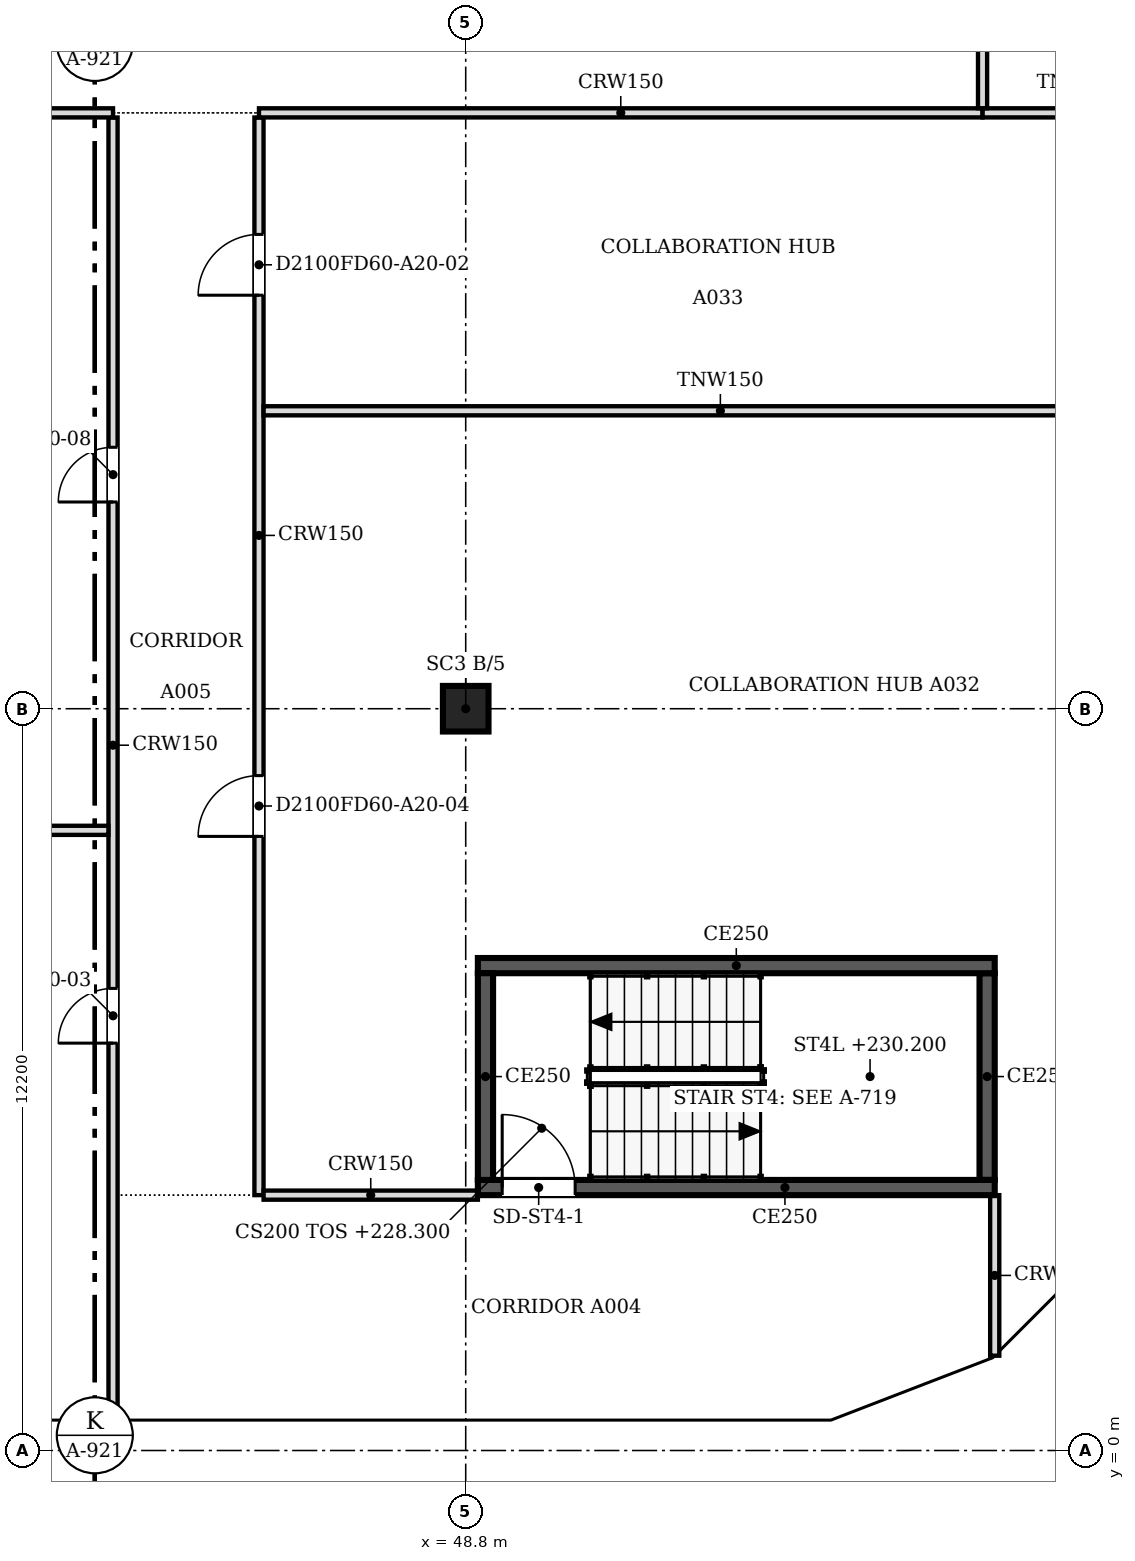
"""IFC4 building model, lengths in metres.
Left out: names, types, materials, properties, quantities, classifications, styles, units other than length and angle.
Written with IfcOpenShell. Run it as: python <this file> out.ifc"""

import sys

from ifc_helpers import new_model, si_unit, direction, frame, frame_2d, origin, origin_2d, place, context, subcontext, project, spatial, polyline, rectangle, outline, extrude, faceted_brep, source, transform, mapped, element, fill, save


model = new_model("IFC4")
c1 = context("Model", 3, precision=1e-05, world=origin(), true_north=direction((0.0, 1.0)))
c2 = subcontext(c1, "Body", "Model", "MODEL_VIEW")
j1 = project(units=[si_unit("LENGTHUNIT", "METRE"), si_unit("PLANEANGLEUNIT", "RADIAN")], contexts=[c1])
p1 = place(None, origin())
s1 = spatial("IfcSite", under=j1, at=p1, CompositionType="ELEMENT")
p2 = place(p1, origin())
s2 = spatial("IfcBuilding", under=s1, at=p2, CompositionType="ELEMENT")
p3 = place(p2, frame((0.0, 0.0, 228.3)))
s3 = spatial("IfcBuildingStorey", under=s2, at=p3, CompositionType="ELEMENT", Elevation=228.3)
p4 = place(p3, frame((48.8, 12.2, 0.0), z_axis=(0.0, 0.0, 1.0), x_axis=(1.0, 0.0, 0.0)))
e1 = element("IfcColumn", 1, at=p4, inside=s3, PredefinedType="COLUMN", context=c2, shape_type="SweptSolid", body=[
    extrude(rectangle(XDim=0.75, YDim=0.75, at=origin_2d()), origin(), (0.0, 0.0, 1.0), 3.5),
])
m1 = source(origin(), c2, "Body", "SweptSolid", [
    extrude(outline(polyline([(3.05, 0.0), (6.1, 3.8), (3.05, 7.6), (0.0, 3.8), (3.05, 0.0)])), frame((0.0, 0.25, 0.0), z_axis=(0.0, -1.0, 0.0), x_axis=(1.0, 0.0, 0.0)), (0.0, 0.0, 1.0), 0.5),
])
p5 = place(p3, frame((39.65, 0.25, -3.8), z_axis=(0.0, 0.0, 1.0), x_axis=(1.0, 0.0, 0.0)))
e2 = element("IfcWall", 2, at=p5, inside=s3, PredefinedType="SOLIDWALL", context=c2, shape_type="MappedRepresentation", body=[
    mapped(m1, transform((0.0, 0.0, 0.0), scale=1.0)),
])
m2 = source(origin(), c2, "Body", "SweptSolid", [
    extrude(outline(polyline([(3.05, 0.399), (5.78, 3.8), (3.05, 7.201), (0.321, 3.8), (3.05, 0.399)])), frame((0.0, 0.26, 0.0), z_axis=(0.0, -1.0, 0.0), x_axis=(1.0, 0.0, 0.0)), (0.0, 0.0, 1.0), 0.52),
])
p6 = place(p5, origin())
e3 = element("IfcOpeningElement", 3, at=p6, cuts=e2, PredefinedType="OPENING", context=c2, shape_type="MappedRepresentation", body=[
    mapped(m2, transform((0.0, 0.0, 0.0), scale=1.0)),
])
p7 = place(p3, frame((45.75, 0.25, -3.8), z_axis=(0.0, 0.0, 1.0), x_axis=(1.0, 0.0, 0.0)))
e4 = element("IfcWall", 4, at=p7, inside=s3, PredefinedType="SOLIDWALL", context=c2, shape_type="MappedRepresentation", body=[
    mapped(m1, transform((0.0, 0.0, 0.0), scale=1.0)),
])
p8 = place(p7, origin())
e5 = element("IfcOpeningElement", 5, at=p8, cuts=e4, PredefinedType="OPENING", context=c2, shape_type="MappedRepresentation", body=[
    mapped(m2, transform((0.0, 0.0, 0.0), scale=1.0)),
])
m3 = source(origin(), c2, "Body", "Brep", [
    faceted_brep([(3.003, -0.25, 0.0), (3.05, -0.25, 0.06), (3.05, -0.25, 7.54), (3.003, -0.25, 7.6), (0.0, -0.25, 3.8), (0.0, 0.25, 3.8), (2.957, 0.25, 7.541), (2.957, 0.25, 0.059), (3.003, 0.0, 0.0), (3.003, 0.0, 7.6)], [[[0, 1, 2, 3, 4]], [[5, 6, 7]], [[1, 0, 8]], [[9, 3, 2]], [[6, 5, 4, 3, 9]], [[5, 7, 8, 0, 4]], [[1, 8, 7, 6, 9, 2]]]),
])
p9 = place(p3, frame((51.85, 0.25, -3.8), z_axis=(0.0, 0.0, 1.0), x_axis=(1.0, 0.0, 0.0)))
e6 = element("IfcWall", 6, at=p9, inside=s3, PredefinedType="SOLIDWALL", context=c2, shape_type="MappedRepresentation", body=[
    mapped(m3, transform((0.0, 0.0, 0.0), scale=1.0)),
])
m4 = source(origin(), c2, "Body", "SweptSolid", [
    extrude(outline(polyline([(2.803, 6.944), (0.319, 3.8), (2.803, 0.656), (2.803, 6.944)])), frame((0.0, 0.26, 0.0), z_axis=(0.0, -1.0, 0.0), x_axis=(1.0, 0.0, 0.0)), (0.0, 0.0, 1.0), 0.52),
])
p10 = place(p9, origin())
e7 = element("IfcOpeningElement", 7, at=p10, cuts=e6, PredefinedType="OPENING", context=c2, shape_type="MappedRepresentation", body=[
    mapped(m4, transform((0.0, 0.0, 0.0), scale=1.0)),
])
m5 = source(origin(), c2, "Body", "Brep", [
    faceted_brep([(0.047, -0.25, 0.0), (2.997, -0.25, 3.8), (0.047, -0.25, 7.6), (0.0, -0.25, 7.541), (0.0, -0.25, 0.059), (0.093, 0.25, 7.54), (2.944, 0.25, 3.868), (2.944, 0.25, 3.732), (0.093, 0.25, 0.06), (2.997, 0.0, 3.8), (0.047, 0.0, 0.0), (0.047, 0.0, 7.6)], [[[0, 1, 2, 3, 4]], [[5, 6, 7, 8]], [[8, 7, 9, 1, 0, 10]], [[6, 5, 11, 2, 1, 9]], [[3, 2, 11]], [[10, 0, 4]], [[8, 10, 4, 3, 11, 5]], [[9, 7, 6]]]),
])
p11 = place(p3, frame((54.81, 0.233, -3.8), z_axis=(0.0, 0.0, 1.0), x_axis=(0.932990326376, 0.359901446078, 0.0)))
e8 = element("IfcWall", 8, at=p11, inside=s3, PredefinedType="SOLIDWALL", context=c2, shape_type="MappedRepresentation", body=[
    mapped(m5, transform((0.0, 0.0, 0.0), scale=1.0)),
])
m6 = source(origin(), c2, "Body", "SweptSolid", [
    extrude(outline(polyline([(0.247, 0.665), (2.681, 3.8), (0.247, 6.935), (0.247, 0.665)])), frame((0.0, 0.26, 0.0), z_axis=(0.0, -1.0, 0.0), x_axis=(1.0, 0.0, 0.0)), (0.0, 0.0, 1.0), 0.52),
])
p12 = place(p11, origin())
e9 = element("IfcOpeningElement", 9, at=p12, cuts=e8, PredefinedType="OPENING", context=c2, shape_type="MappedRepresentation", body=[
    mapped(m6, transform((0.0, 0.0, 0.0), scale=1.0)),
])
m7 = source(origin(), c2, "Body", "Brep", [
    faceted_brep([(2.944, -0.25, 0.0), (2.997, -0.25, 0.068), (2.997, -0.25, 7.532), (2.944, -0.25, 7.6), (0.0, -0.25, 3.8), (0.053, 0.25, 3.868), (2.891, 0.25, 7.532), (2.891, 0.25, 0.068), (0.053, 0.25, 3.732), (2.944, 0.0, 0.0), (2.944, 0.0, 7.6), (0.0, 0.0, 3.8)], [[[0, 1, 2, 3, 4]], [[5, 6, 7, 8]], [[1, 0, 9]], [[10, 3, 2]], [[6, 5, 11, 4, 3, 10]], [[8, 7, 9, 0, 4, 11]], [[8, 11, 5]], [[1, 9, 7, 6, 10, 2]]]),
])
p13 = place(p3, frame((57.606, 1.312, -3.8), z_axis=(0.0, 0.0, 1.0), x_axis=(0.707147509625, 0.707066050402, 0.0)))
e10 = element("IfcWall", 10, at=p13, inside=s3, PredefinedType="SOLIDWALL", context=c2, shape_type="MappedRepresentation", body=[
    mapped(m7, transform((0.0, 0.0, 0.0), scale=1.0)),
])
m8 = source(origin(), c2, "Body", "SweptSolid", [
    extrude(outline(polyline([(2.744, 6.934), (0.316, 3.8), (2.744, 0.666), (2.744, 6.934)])), frame((0.0, 0.26, 0.0), z_axis=(0.0, -1.0, 0.0), x_axis=(1.0, 0.0, 0.0)), (0.0, 0.0, 1.0), 0.52),
])
p14 = place(p13, origin())
e11 = element("IfcOpeningElement", 11, at=p14, cuts=e10, PredefinedType="OPENING", context=c2, shape_type="MappedRepresentation", body=[
    mapped(m8, transform((0.0, 0.0, 0.0), scale=1.0)),
])
m9 = source(origin(), c2, "Body", "Brep", [
    faceted_brep([(3.05, -0.25, 0.0), (6.1, -0.25, 3.8), (6.1, -0.25, 3.8), (0.0, -0.25, 3.8), (0.0, 0.25, 3.8), (6.1, 0.25, 3.8), (6.1, 0.25, 3.8), (3.05, 0.25, 0.0)], [[[0, 1, 2, 3]], [[4, 5, 6, 7]], [[7, 6, 1, 0]], [[5, 4, 3, 2]], [[4, 7, 0, 3]], [[1, 6, 5, 2]]]),
])
p15 = place(p3, frame((36.6, 0.25, 0.0), z_axis=(0.0, 0.0, 1.0), x_axis=(1.0, 0.0, 0.0)))
e12 = element("IfcWall", 12, at=p15, inside=s3, PredefinedType="SOLIDWALL", context=c2, shape_type="MappedRepresentation", body=[
    mapped(m9, transform((0.0, 0.0, 0.0), scale=1.0)),
])
m10 = source(origin(), c2, "Body", "SweptSolid", [
    extrude(outline(polyline([(3.05, 0.399), (5.579, 3.55), (0.521, 3.55), (3.05, 0.399)])), frame((0.0, 0.26, 0.0), z_axis=(0.0, -1.0, 0.0), x_axis=(1.0, 0.0, 0.0)), (0.0, 0.0, 1.0), 0.52),
])
p16 = place(p15, origin())
e13 = element("IfcOpeningElement", 13, at=p16, cuts=e12, PredefinedType="OPENING", context=c2, shape_type="MappedRepresentation", body=[
    mapped(m10, transform((0.0, 0.0, 0.0), scale=1.0)),
])
m11 = source(origin(), c2, "Body", "SweptSolid", [
    extrude(outline(polyline([(3.05, 0.0), (6.1, 3.8), (0.0, 3.8), (3.05, 0.0)])), frame((0.0, 0.25, 0.0), z_axis=(0.0, -1.0, 0.0), x_axis=(1.0, 0.0, 0.0)), (0.0, 0.0, 1.0), 0.5),
])
p17 = place(p3, frame((42.7, 0.25, 0.0), z_axis=(0.0, 0.0, 1.0), x_axis=(1.0, 0.0, 0.0)))
e14 = element("IfcWall", 14, at=p17, inside=s3, PredefinedType="SOLIDWALL", context=c2, shape_type="MappedRepresentation", body=[
    mapped(m11, transform((0.0, 0.0, 0.0), scale=1.0)),
])
p18 = place(p17, origin())
e15 = element("IfcOpeningElement", 15, at=p18, cuts=e14, PredefinedType="OPENING", context=c2, shape_type="MappedRepresentation", body=[
    mapped(m10, transform((0.0, 0.0, 0.0), scale=1.0)),
])
m12 = source(origin(), c2, "Body", "Brep", [
    faceted_brep([(3.05, -0.25, 0.0), (6.053, -0.25, 3.8), (0.0, -0.25, 3.8), (0.0, 0.25, 3.8), (6.007, 0.25, 3.8), (6.007, 0.25, 3.741), (3.05, 0.25, 0.0), (6.053, 0.0, 3.8)], [[[0, 1, 2]], [[3, 4, 5, 6]], [[6, 5, 7, 1, 0]], [[4, 3, 2, 1, 7]], [[3, 6, 0, 2]], [[5, 4, 7]]]),
])
p19 = place(p3, frame((48.8, 0.25, 0.0), z_axis=(0.0, 0.0, 1.0), x_axis=(1.0, 0.0, 0.0)))
e16 = element("IfcWall", 16, at=p19, inside=s3, PredefinedType="SOLIDWALL", context=c2, shape_type="MappedRepresentation", body=[
    mapped(m12, transform((0.0, 0.0, 0.0), scale=1.0)),
])
m13 = source(origin(), c2, "Body", "SweptSolid", [
    extrude(outline(polyline([(3.049, 0.401), (5.537, 3.55), (0.521, 3.55), (3.049, 0.401)])), frame((0.0, 0.26, 0.0), z_axis=(0.0, -1.0, 0.0), x_axis=(1.0, 0.0, 0.0)), (0.0, 0.0, 1.0), 0.52),
])
p20 = place(p19, origin())
e17 = element("IfcOpeningElement", 17, at=p20, cuts=e16, PredefinedType="OPENING", context=c2, shape_type="MappedRepresentation", body=[
    mapped(m13, transform((0.0, 0.0, 0.0), scale=1.0)),
])
m14 = source(origin(), c2, "Body", "Brep", [
    faceted_brep([(2.95, -0.25, 0.0), (3.003, -0.25, 0.068), (3.003, -0.25, 3.8), (0.0, -0.25, 3.8), (0.047, 0.25, 3.8), (2.898, 0.25, 3.8), (2.898, 0.25, 0.068), (0.047, 0.25, 3.74), (2.95, 0.0, 0.0), (0.0, 0.0, 3.8)], [[[0, 1, 2, 3]], [[4, 5, 6, 7]], [[1, 0, 8]], [[5, 4, 9, 3, 2]], [[7, 6, 8, 0, 3, 9]], [[7, 9, 4]], [[1, 8, 6, 5, 2]]]),
])
p21 = place(p3, frame((54.854, 0.25, 0.0), z_axis=(0.0, 0.0, 1.0), x_axis=(0.932970071518, 0.359953949349, 0.0)))
e18 = element("IfcWall", 18, at=p21, inside=s3, PredefinedType="SOLIDWALL", context=c2, shape_type="MappedRepresentation", body=[
    mapped(m14, transform((0.0, 0.0, 0.0), scale=1.0)),
])
m15 = source(origin(), c2, "Body", "SweptSolid", [
    extrude(outline(polyline([(2.75, 3.55), (0.511, 3.55), (2.75, 0.665), (2.75, 3.55)])), frame((0.0, 0.26, 0.0), z_axis=(0.0, -1.0, 0.0), x_axis=(1.0, 0.0, 0.0)), (0.0, 0.0, 1.0), 0.52),
])
p22 = place(p21, origin())
e19 = element("IfcOpeningElement", 19, at=p22, cuts=e18, PredefinedType="OPENING", context=c2, shape_type="MappedRepresentation", body=[
    mapped(m15, transform((0.0, 0.0, 0.0), scale=1.0)),
])
m16 = source(origin(), c2, "Body", "Brep", [
    faceted_brep([(0.053, -0.25, 0.0), (2.997, -0.25, 3.8), (0.0, -0.25, 3.8), (0.0, -0.25, 0.068), (0.106, 0.25, 3.8), (2.944, 0.25, 3.8), (2.944, 0.25, 3.732), (0.106, 0.25, 0.068), (2.997, 0.0, 3.8), (0.053, 0.0, 0.0)], [[[0, 1, 2, 3]], [[4, 5, 6, 7]], [[7, 6, 8, 1, 0, 9]], [[5, 4, 2, 1, 8]], [[9, 0, 3]], [[7, 9, 3, 2, 4]], [[6, 5, 8]]]),
])
p23 = place(p3, frame((57.569, 1.274, 0.0), z_axis=(0.0, 0.0, 1.0), x_axis=(0.707066050402, 0.707147509625, 0.0)))
e20 = element("IfcWall", 20, at=p23, inside=s3, PredefinedType="SOLIDWALL", context=c2, shape_type="MappedRepresentation", body=[
    mapped(m16, transform((0.0, 0.0, 0.0), scale=1.0)),
])
m17 = source(origin(), c2, "Body", "SweptSolid", [
    extrude(outline(polyline([(0.253, 0.666), (2.487, 3.55), (0.253, 3.55), (0.253, 0.666)])), frame((0.0, 0.26, 0.0), z_axis=(0.0, -1.0, 0.0), x_axis=(1.0, 0.0, 0.0)), (0.0, 0.0, 1.0), 0.52),
])
p24 = place(p23, origin())
e21 = element("IfcOpeningElement", 21, at=p24, cuts=e20, PredefinedType="OPENING", context=c2, shape_type="MappedRepresentation", body=[
    mapped(m17, transform((0.0, 0.0, 0.0), scale=1.0)),
])
p25 = place(p3, frame((57.5, 4.325, 0.0), z_axis=(0.0, 0.0, 1.0), x_axis=(-1.0, 0.0, 0.0)))
e22 = element("IfcWall", 22, at=p25, inside=s3, PredefinedType="SOLIDWALL", context=c2, shape_type="SweptSolid", body=[
    extrude(rectangle(XDim=8.5, YDim=0.25, at=frame_2d((4.25, 0.0))), origin(), (0.0, 0.0, 1.0), 3.8),
])
m18 = source(origin(), c2, "Body", "SweptSolid", [
    extrude(rectangle(XDim=1.2, YDim=2.1, at=frame_2d((0.6, 1.05))), frame((0.0, 0.135, 0.0), z_axis=(0.0, -1.0, 0.0), x_axis=(1.0, 0.0, 0.0)), (0.0, 0.0, 1.0), 0.27),
])
p26 = place(p25, frame((6.9, 0.0, 0.0)))
e23 = element("IfcOpeningElement", 23, at=p26, cuts=e22, PredefinedType="OPENING", context=c2, shape_type="MappedRepresentation", body=[
    mapped(m18, transform((0.0, 0.0, 0.0), scale=1.0)),
])
p27 = place(p3, frame((49.125, 4.45, 0.0), z_axis=(0.0, 0.0, 1.0), x_axis=(0.0, 1.0, 0.0)))
e24 = element("IfcWall", 24, at=p27, inside=s3, PredefinedType="SOLIDWALL", context=c2, shape_type="SweptSolid", body=[
    extrude(rectangle(XDim=3.4, YDim=0.25, at=frame_2d((1.7, 0.0))), origin(), (0.0, 0.0, 1.0), 3.8),
])
p28 = place(p3, frame((49.0, 7.975, 0.0), z_axis=(0.0, 0.0, 1.0), x_axis=(1.0, 0.0, 0.0)))
e25 = element("IfcWall", 25, at=p28, inside=s3, PredefinedType="SOLIDWALL", context=c2, shape_type="SweptSolid", body=[
    extrude(rectangle(XDim=8.5, YDim=0.25, at=frame_2d((4.25, 0.0))), origin(), (0.0, 0.0, 1.0), 3.8),
])
p29 = place(p3, frame((57.375, 7.85, 0.0), z_axis=(0.0, 0.0, 1.0), x_axis=(0.0, -1.0, 0.0)))
e26 = element("IfcWall", 26, at=p29, inside=s3, PredefinedType="SOLIDWALL", context=c2, shape_type="SweptSolid", body=[
    extrude(rectangle(XDim=3.4, YDim=0.25, at=frame_2d((1.7, 0.0))), origin(), (0.0, 0.0, 1.0), 3.8),
])
p30 = place(p3, frame((43.0, 0.5, 0.0), z_axis=(0.0, 0.0, 1.0), x_axis=(0.0, 1.0, 0.0)))
e27 = element("IfcWall", 27, at=p30, inside=s3, PredefinedType="PARTITIONING", context=c2, shape_type="SweptSolid", body=[
    extrude(rectangle(XDim=21.424, YDim=0.15, at=frame_2d((10.712, 0.0))), origin(), (0.0, 0.0, 1.0), 2.888),
])
m19 = source(origin(), c2, "Body", "SweptSolid", [
    extrude(rectangle(XDim=0.9, YDim=2.1, at=frame_2d((0.45, 1.05))), frame((0.0, 0.085, 0.0), z_axis=(0.0, -1.0, 0.0), x_axis=(1.0, 0.0, 0.0)), (0.0, 0.0, 1.0), 0.17),
])
p31 = place(p30, frame((6.2, 0.0, 0.0)))
e28 = element("IfcOpeningElement", 28, at=p31, cuts=e27, PredefinedType="OPENING", context=c2, shape_type="MappedRepresentation", body=[
    mapped(m19, transform((0.0, 0.0, 0.0), scale=1.0)),
])
p32 = place(p30, frame((15.1, 0.0, 0.0)))
e29 = element("IfcOpeningElement", 29, at=p32, cuts=e27, PredefinedType="OPENING", context=c2, shape_type="MappedRepresentation", body=[
    mapped(m19, transform((0.0, 0.0, 0.0), scale=1.0)),
])
p33 = place(p3, frame((57.5, 1.559, 0.0), z_axis=(0.0, 0.0, 1.0), x_axis=(0.0, 1.0, 0.0)))
e30 = element("IfcWall", 30, at=p33, inside=s3, PredefinedType="PARTITIONING", context=c2, shape_type="SweptSolid", body=[
    extrude(rectangle(XDim=2.641, YDim=0.15, at=frame_2d((1.32, 0.0))), origin(), (0.0, 0.0, 1.0), 2.888),
])
p34 = place(p3, frame((45.4, 21.924, 0.0), z_axis=(0.0, 0.0, 1.0), x_axis=(0.0, -1.0, 0.0)))
e31 = element("IfcWall", 31, at=p34, inside=s3, PredefinedType="PARTITIONING", context=c2, shape_type="SweptSolid", body=[
    extrude(rectangle(XDim=17.724, YDim=0.15, at=frame_2d((8.862, 0.0))), origin(), (0.0, 0.0, 1.0), 2.888),
])
m20 = source(origin(), c2, "Body", "SweptSolid", [
    extrude(rectangle(XDim=1.0, YDim=2.1, at=frame_2d((0.5, 1.05))), frame((0.0, 0.085, 0.0), z_axis=(0.0, -1.0, 0.0), x_axis=(1.0, 0.0, 0.0)), (0.0, 0.0, 1.0), 0.17),
])
p35 = place(p34, frame((1.923, 0.0, 0.0)))
e32 = element("IfcOpeningElement", 32, at=p35, cuts=e31, PredefinedType="OPENING", context=c2, shape_type="MappedRepresentation", body=[
    mapped(m20, transform((0.0, 0.0, 0.0), scale=1.0)),
])
p36 = place(p34, frame((10.824, 0.0, 0.0)))
e33 = element("IfcOpeningElement", 33, at=p36, cuts=e31, PredefinedType="OPENING", context=c2, shape_type="MappedRepresentation", body=[
    mapped(m20, transform((0.0, 0.0, 0.0), scale=1.0)),
])
p37 = place(p3, frame((45.476, 4.2, 0.0), z_axis=(0.0, 0.0, 1.0), x_axis=(1.0, 0.0, 0.0)))
e34 = element("IfcWall", 34, at=p37, inside=s3, PredefinedType="PARTITIONING", context=c2, shape_type="SweptSolid", body=[
    extrude(rectangle(XDim=3.524, YDim=0.15, at=frame_2d((1.762, 0.0))), origin(), (0.0, 0.0, 1.0), 2.888),
])
p38 = place(p3, frame((27.575, 10.2, 0.0), z_axis=(0.0, 0.0, 1.0), x_axis=(1.0, 0.0, 0.0)))
e35 = element("IfcWall", 35, at=p38, inside=s3, PredefinedType="PARTITIONING", context=c2, shape_type="SweptSolid", body=[
    extrude(rectangle(XDim=15.349, YDim=0.15, at=frame_2d((7.675, 0.0))), origin(), (0.0, 0.0, 1.0), 2.888),
])
p39 = place(p3, frame((45.476, 17.1, 0.0), z_axis=(0.0, 0.0, 1.0), x_axis=(1.0, 0.0, 0.0)))
e36 = element("IfcWall", 36, at=p39, inside=s3, PredefinedType="PARTITIONING", context=c2, shape_type="SweptSolid", body=[
    extrude(rectangle(XDim=15.024, YDim=0.15, at=frame_2d((7.512, 0.0))), origin(), (0.0, 0.0, 1.0), 2.888),
])
p40 = place(p3, frame((30.5, 22.0, 0.0), z_axis=(0.0, 0.0, 1.0), x_axis=(1.0, 0.0, 0.0)))
e37 = element("IfcWall", 37, at=p40, inside=s3, PredefinedType="PARTITIONING", context=c2, shape_type="SweptSolid", body=[
    extrude(rectangle(XDim=12.5, YDim=0.15, at=frame_2d((6.25, 0.0))), origin(), (0.0, 0.0, 1.0), 2.888),
])
p41 = place(p3, frame((45.4, 22.0, 0.0), z_axis=(0.0, 0.0, 1.0), x_axis=(1.0, 0.0, 0.0)))
e38 = element("IfcWall", 38, at=p41, inside=s3, PredefinedType="PARTITIONING", context=c2, shape_type="SweptSolid", body=[
    extrude(rectangle(XDim=11.9, YDim=0.15, at=frame_2d((5.95, 0.0))), origin(), (0.0, 0.0, 1.0), 2.888),
])
p42 = place(p3, frame((57.301, 22.0, 0.0), z_axis=(0.0, 0.0, 1.0), x_axis=(1.0, 0.0, 0.0)))
e39 = element("IfcWall", 39, at=p42, inside=s3, PredefinedType="PARTITIONING", context=c2, shape_type="SweptSolid", body=[
    extrude(rectangle(XDim=3.199, YDim=0.15, at=frame_2d((1.6, 0.0))), origin(), (0.0, 0.0, 1.0), 2.888),
])
p43 = place(p3, frame((57.3, 30.6, 0.0), z_axis=(0.0, 0.0, 1.0), x_axis=(0.0, -1.0, 0.0)))
e40 = element("IfcWall", 40, at=p43, inside=s3, PredefinedType="PARTITIONING", context=c2, shape_type="SweptSolid", body=[
    extrude(rectangle(XDim=8.524, YDim=0.15, at=frame_2d((4.262, 0.0))), origin(), (0.0, 0.0, 1.0), 2.888),
])
p44 = place(p43, frame((3.824, 0.0, 0.0)))
e41 = element("IfcOpeningElement", 41, at=p44, cuts=e40, PredefinedType="OPENING", context=c2, shape_type="MappedRepresentation", body=[
    mapped(m19, transform((0.0, 0.0, 0.0), scale=1.0)),
])
m21 = source(origin(), c2, "Body", "SweptSolid", [
    extrude(rectangle(XDim=1.2, YDim=2.1, at=frame_2d((0.6, 1.05))), frame((0.0, 0.025, 0.0), z_axis=(0.0, -1.0, 0.0), x_axis=(1.0, 0.0, 0.0)), (0.0, 0.0, 1.0), 0.05),
])
p45 = place(p26, origin())
e42 = element("IfcDoor", 42, at=p45, inside=s3, OperationType="SINGLE_SWING_RIGHT", PredefinedType="DOOR", context=c2, shape_type="MappedRepresentation", body=[
    mapped(m21, transform((0.0, 0.0, 0.0), scale=1.0)),
])
fill(e23, e42)
m22 = source(origin(), c2, "Body", "SweptSolid", [
    extrude(rectangle(XDim=1.0, YDim=2.1, at=frame_2d((0.5, 1.05))), frame((0.0, 0.025, 0.0), z_axis=(0.0, -1.0, 0.0), x_axis=(1.0, 0.0, 0.0)), (0.0, 0.0, 1.0), 0.05),
])
p46 = place(p35, origin())
e43 = element("IfcDoor", 43, at=p46, inside=s3, OperationType="SINGLE_SWING_RIGHT", PredefinedType="DOOR", context=c2, shape_type="MappedRepresentation", body=[
    mapped(m22, transform((0.0, 0.0, 0.0), scale=1.0)),
])
fill(e32, e43)
m23 = source(origin(), c2, "Body", "SweptSolid", [
    extrude(rectangle(XDim=0.9, YDim=2.1, at=frame_2d((0.45, 1.05))), frame((0.0, 0.025, 0.0), z_axis=(0.0, -1.0, 0.0), x_axis=(1.0, 0.0, 0.0)), (0.0, 0.0, 1.0), 0.05),
])
p47 = place(p31, origin())
e44 = element("IfcDoor", 44, at=p47, inside=s3, OperationType="SINGLE_SWING_LEFT", PredefinedType="DOOR", context=c2, shape_type="MappedRepresentation", body=[
    mapped(m23, transform((0.0, 0.0, 0.0), scale=1.0)),
])
fill(e28, e44)
p48 = place(p32, origin())
e45 = element("IfcDoor", 45, at=p48, inside=s3, OperationType="SINGLE_SWING_LEFT", PredefinedType="DOOR", context=c2, shape_type="MappedRepresentation", body=[
    mapped(m23, transform((0.0, 0.0, 0.0), scale=1.0)),
])
fill(e29, e45)
p49 = place(p36, origin())
e46 = element("IfcDoor", 46, at=p49, inside=s3, OperationType="SINGLE_SWING_RIGHT", PredefinedType="DOOR", context=c2, shape_type="MappedRepresentation", body=[
    mapped(m22, transform((0.0, 0.0, 0.0), scale=1.0)),
])
fill(e33, e46)
save(model, sys.argv[1])
